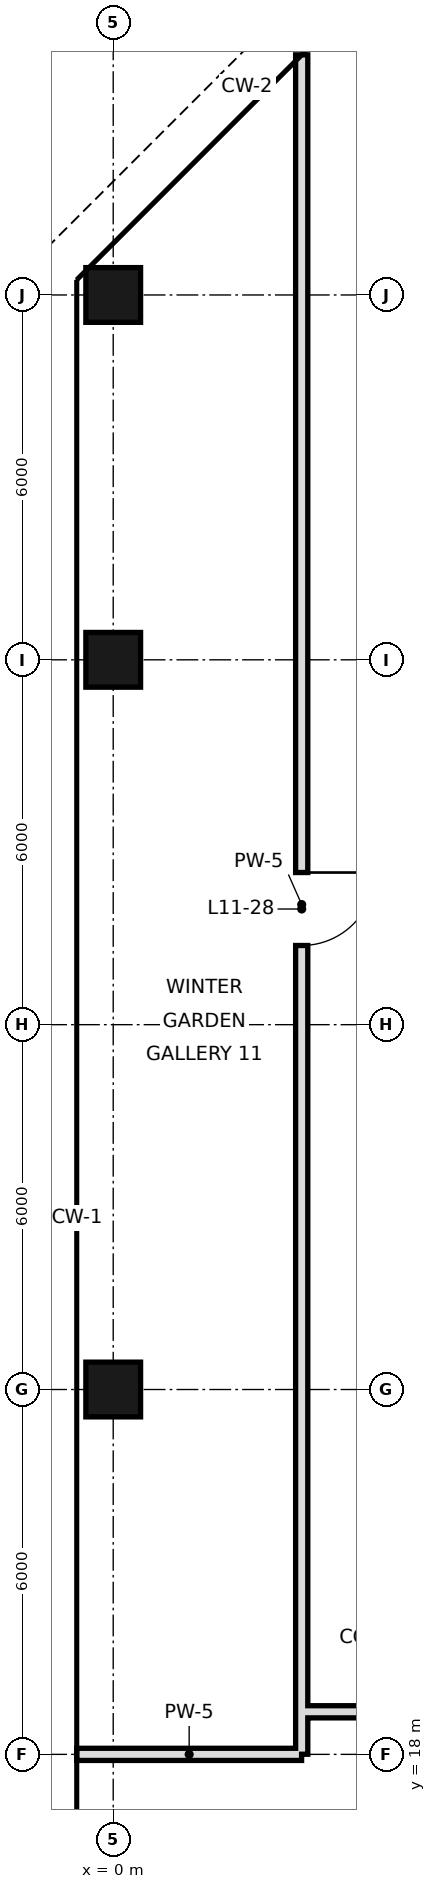
"""IFC4 building model, lengths in metres.
Left out: names, types, materials, properties, quantities, classifications, styles, units other than length and angle.
Written with IfcOpenShell. Run it as: python <this file> out.ifc"""

import sys

from ifc_helpers import new_model, si_unit, direction, frame, frame_2d, origin, origin_2d, place, context, subcontext, project, spatial, rectangle, hollow_rectangle, extrude, element, fill, save


model = new_model("IFC4")
c1 = context("Model", 3, precision=1e-05, world=origin(), true_north=direction((0.0, 1.0)))
c2 = subcontext(c1, "Body", "Model", "MODEL_VIEW")
j1 = project(units=[si_unit("LENGTHUNIT", "METRE"), si_unit("PLANEANGLEUNIT", "RADIAN")], contexts=[c1])
p1 = place(None, origin())
s1 = spatial("IfcSite", under=j1, at=p1, CompositionType="ELEMENT")
p2 = place(p1, origin())
s2 = spatial("IfcBuilding", under=s1, at=p2, CompositionType="ELEMENT")
p3 = place(p2, frame((0.0, 0.0, 60.6)))
s3 = spatial("IfcBuildingStorey", under=s2, at=p3, CompositionType="ELEMENT", Elevation=60.6)
for number, where, z_axis, x_axis in (
    (1, (0.0, 24.0, 0.0), (0.0, 0.0, 1.0), (1.0, 0.0, 0.0)),
    (2, (0.0, 36.0, 0.0), (0.0, 0.0, 1.0), (1.0, 0.0, 0.0)),
    (3, (0.0, 42.0, 0.0), (0.0, 0.0, 1.0), (1.0, 0.0, 0.0)),
):
    element("IfcColumn", number, at=place(p3, frame(where, z_axis=z_axis, x_axis=x_axis)), inside=s3, PredefinedType="COLUMN", context=c2, shape_type="SweptSolid", body=[
        extrude(hollow_rectangle(XDim=0.9, YDim=0.9, WallThickness=0.045, at=origin_2d()), origin(), (0.0, 0.0, 1.0), 3.6),
    ])
p4 = place(p3, frame((3.1, 18.002, 0.0), z_axis=(0.0, 0.0, 1.0), x_axis=(0.0, 1.0, 0.0)))
e4 = element("IfcWall", 4, at=p4, inside=s3, PredefinedType="SOLIDWALL", context=c2, shape_type="SweptSolid", body=[
    extrude(rectangle(XDim=27.947, YDim=0.2, at=frame_2d((13.974, 0.0))), origin(), (0.0, 0.0, 1.0), 2.97),
])
p5 = place(p4, frame((13.3, 0.0, 0.0)))
e5 = element("IfcOpeningElement", 5, at=p5, cuts=e4, PredefinedType="OPENING", context=c2, shape_type="SweptSolid", body=[
    extrude(rectangle(XDim=1.2, YDim=2.4, at=frame_2d((0.6, 1.2))), frame((0.0, 0.11, 0.0), z_axis=(0.0, -1.0, 0.0), x_axis=(1.0, 0.0, 0.0)), (0.0, 0.0, 1.0), 0.22),
])
p6 = place(p3, frame((-0.6, 18.0, 0.0), z_axis=(0.0, 0.0, 1.0), x_axis=(1.0, 0.0, 0.0)))
e6 = element("IfcWall", 6, at=p6, inside=s3, PredefinedType="SOLIDWALL", context=c2, shape_type="SweptSolid", body=[
    extrude(rectangle(XDim=3.698, YDim=0.2, at=frame_2d((1.849, 0.0))), origin(), (0.0, 0.0, 1.0), 2.72),
])
p7 = place(p3, frame((3.1, 18.7, 0.0), z_axis=(0.0, 0.0, 1.0), x_axis=(1.0, 0.0, 0.0)))
e7 = element("IfcWall", 7, at=p7, inside=s3, PredefinedType="SOLIDWALL", context=c2, shape_type="SweptSolid", body=[
    extrude(rectangle(XDim=38.9, YDim=0.2, at=frame_2d((19.45, 0.0))), origin(), (0.0, 0.0, 1.0), 2.72),
])
p8 = place(p7, frame((34.44, 0.0, 0.0)))
e8 = element("IfcOpeningElement", 8, at=p8, cuts=e7, PredefinedType="OPENING", context=c2, shape_type="SweptSolid", body=[
    extrude(rectangle(XDim=1.2, YDim=2.4, at=frame_2d((0.6, 1.2))), frame((0.0, 0.11, 0.0), z_axis=(0.0, -1.0, 0.0), x_axis=(1.0, 0.0, 0.0)), (0.0, 0.0, 1.0), 0.22),
])
p9 = place(p7, frame((9.43, 0.0, 0.0)))
e9 = element("IfcOpeningElement", 9, at=p9, cuts=e7, PredefinedType="OPENING", context=c2, shape_type="SweptSolid", body=[
    extrude(rectangle(XDim=1.8, YDim=2.4, at=frame_2d((0.9, 1.2))), frame((0.0, 0.11, 0.0), z_axis=(0.0, -1.0, 0.0), x_axis=(1.0, 0.0, 0.0)), (0.0, 0.0, 1.0), 0.22),
])
p10 = place(p5, origin())
e10 = element("IfcDoor", 10, at=p10, inside=s3, OperationType="SINGLE_SWING_RIGHT", PredefinedType="DOOR", context=c2, shape_type="SweptSolid", body=[
    extrude(rectangle(XDim=1.2, YDim=2.4, at=frame_2d((0.6, 1.2))), frame((0.0, 0.025, 0.0), z_axis=(0.0, -1.0, 0.0), x_axis=(1.0, 0.0, 0.0)), (0.0, 0.0, 1.0), 0.05),
])
fill(e5, e10)
save(model, sys.argv[1])
